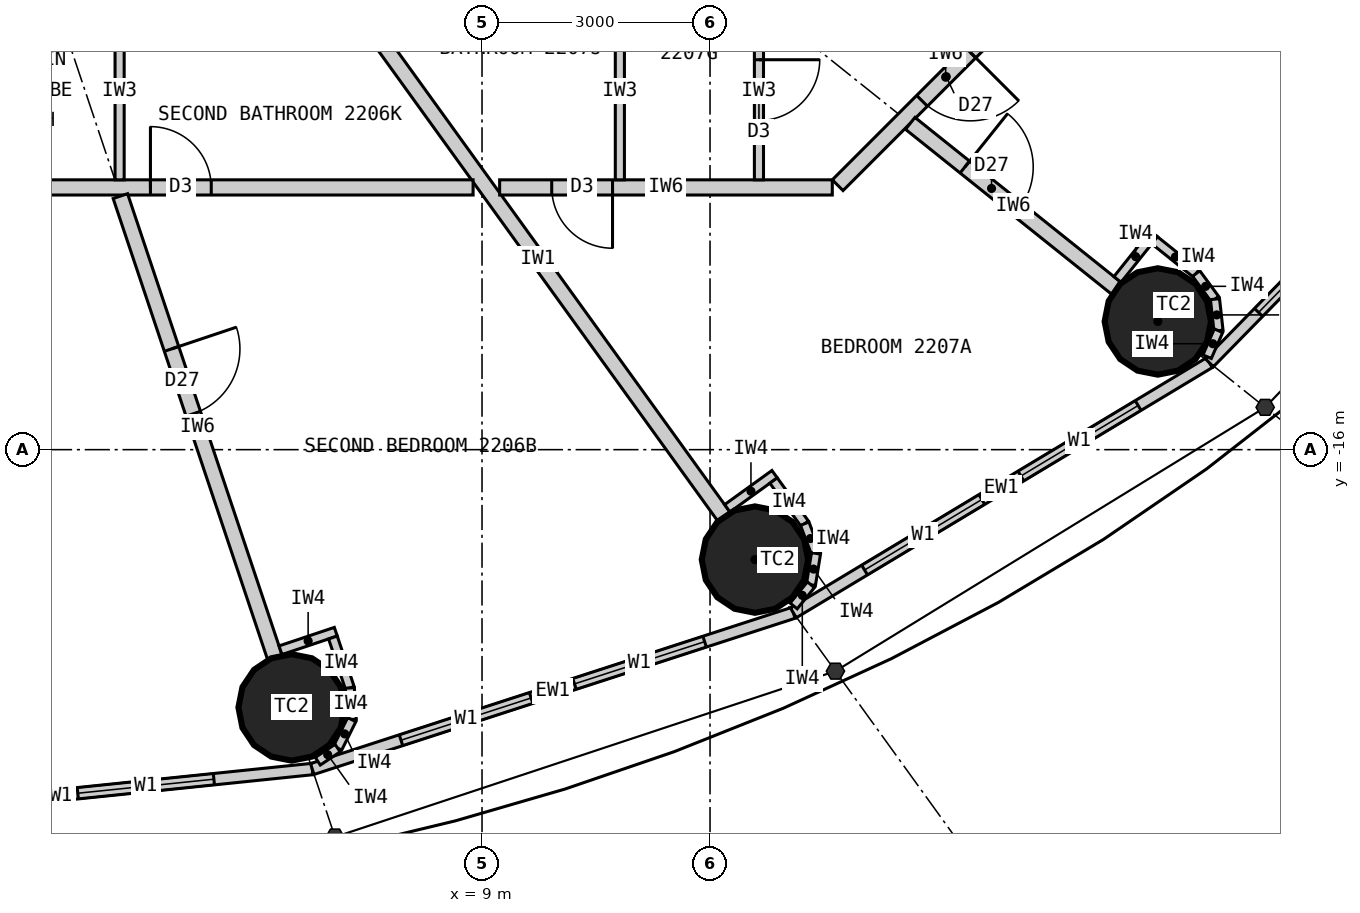
"""IFC4 building model, lengths in metres.
Left out: names, types, materials, properties, quantities, classifications, styles, units other than length and angle.
Written with IfcOpenShell. Run it as: python <this file> out.ifc"""

import sys

from ifc_helpers import new_model, si_unit, direction, frame, frame_2d, origin, origin_2d, place, context, subcontext, project, spatial, rectangle, circle, extrude, element, fill, save


model = new_model("IFC4")
c1 = context("Model", 3, precision=1e-05, world=origin(), true_north=direction((0.0, 1.0)))
c2 = subcontext(c1, "Body", "Model", "MODEL_VIEW")
j1 = project(units=[si_unit("LENGTHUNIT", "METRE"), si_unit("PLANEANGLEUNIT", "RADIAN")], contexts=[c1])
p1 = place(None, origin())
s1 = spatial("IfcSite", under=j1, at=p1, CompositionType="ELEMENT")
p2 = place(p1, origin())
s2 = spatial("IfcBuilding", under=s1, at=p2, CompositionType="ELEMENT")
p3 = place(p2, frame((0.0, 0.0, 87.0)))
s3 = spatial("IfcBuildingStorey", under=s2, at=p3, CompositionType="ELEMENT", Elevation=87.0)
for number, where, z_axis, x_axis in (
    (1, (6.495, -19.391, 0.0), (0.0, 0.0, 1.0), (1.0, 0.0, 0.0)),
    (2, (12.591, -17.447, 0.0), (0.0, 0.0, 1.0), (1.0, 0.0, 0.0)),
    (3, (17.892, -14.313, 0.0), (0.0, 0.0, 1.0), (1.0, 0.0, 0.0)),
):
    element("IfcColumn", number, at=place(p3, frame(where, z_axis=z_axis, x_axis=x_axis)), inside=s3, PredefinedType="COLUMN", context=c2, shape_type="SweptSolid", body=[
        extrude(circle(Radius=0.7, at=origin_2d()), origin(), (0.0, 0.0, 1.0), 3.3),
    ])
p4 = place(p3, frame((0.0, -20.9, 0.0), z_axis=(0.0, 0.0, 1.0), x_axis=(0.994721394369, 0.102612609291, 0.0)))
e4 = element("IfcWall", 4, at=p4, inside=s3, PredefinedType="ELEMENTEDWALL", context=c2, shape_type="SweptSolid", body=[
    extrude(rectangle(XDim=6.802, YDim=0.15, at=frame_2d((3.401, 0.0))), origin(), (0.0, 0.0, 1.0), 3.12),
])
p5 = place(p4, frame((1.301, 0.0, 0.9)))
e5 = element("IfcOpeningElement", 5, at=p5, cuts=e4, PredefinedType="OPENING", context=c2, shape_type="SweptSolid", body=[
    extrude(rectangle(XDim=1.8, YDim=1.9, at=frame_2d((0.9, 0.95))), frame((0.0, 0.085, 0.0), z_axis=(0.0, -1.0, 0.0), x_axis=(1.0, 0.0, 0.0)), (0.0, 0.0, 1.0), 0.17),
])
p6 = place(p4, frame((3.701, 0.0, 0.9)))
e6 = element("IfcOpeningElement", 6, at=p6, cuts=e4, PredefinedType="OPENING", context=c2, shape_type="SweptSolid", body=[
    extrude(rectangle(XDim=1.8, YDim=1.9, at=frame_2d((0.9, 0.95))), frame((0.0, 0.085, 0.0), z_axis=(0.0, -1.0, 0.0), x_axis=(1.0, 0.0, 0.0)), (0.0, 0.0, 1.0), 0.17),
])
p7 = place(p3, frame((6.766, -20.202, 0.0), z_axis=(0.0, 0.0, 1.0), x_axis=(0.951137534625, 0.308767534285, 0.0)))
e7 = element("IfcWall", 7, at=p7, inside=s3, PredefinedType="ELEMENTEDWALL", context=c2, shape_type="SweptSolid", body=[
    extrude(rectangle(XDim=6.655, YDim=0.15, at=frame_2d((3.328, 0.0))), origin(), (0.0, 0.0, 1.0), 3.12),
])
p8 = place(p7, frame((1.228, 0.0, 0.9)))
e8 = element("IfcOpeningElement", 8, at=p8, cuts=e7, PredefinedType="OPENING", context=c2, shape_type="SweptSolid", body=[
    extrude(rectangle(XDim=1.8, YDim=1.9, at=frame_2d((0.9, 0.95))), frame((0.0, 0.085, 0.0), z_axis=(0.0, -1.0, 0.0), x_axis=(1.0, 0.0, 0.0)), (0.0, 0.0, 1.0), 0.17),
])
p9 = place(p7, frame((3.628, 0.0, 0.9)))
e9 = element("IfcOpeningElement", 9, at=p9, cuts=e7, PredefinedType="OPENING", context=c2, shape_type="SweptSolid", body=[
    extrude(rectangle(XDim=1.8, YDim=1.9, at=frame_2d((0.9, 0.95))), frame((0.0, 0.085, 0.0), z_axis=(0.0, -1.0, 0.0), x_axis=(1.0, 0.0, 0.0)), (0.0, 0.0, 1.0), 0.17),
])
p10 = place(p3, frame((13.096, -18.147, 0.0), z_axis=(0.0, 0.0, 1.0), x_axis=(0.856983180864, 0.515344377787, 0.0)))
e10 = element("IfcWall", 10, at=p10, inside=s3, PredefinedType="ELEMENTEDWALL", context=c2, shape_type="SweptSolid", body=[
    extrude(rectangle(XDim=6.386, YDim=0.15, at=frame_2d((3.193, 0.0))), origin(), (0.0, 0.0, 1.0), 3.12),
])
p11 = place(p10, frame((1.093, 0.0, 0.9)))
e11 = element("IfcOpeningElement", 11, at=p11, cuts=e10, PredefinedType="OPENING", context=c2, shape_type="SweptSolid", body=[
    extrude(rectangle(XDim=1.8, YDim=1.9, at=frame_2d((0.9, 0.95))), frame((0.0, 0.085, 0.0), z_axis=(0.0, -1.0, 0.0), x_axis=(1.0, 0.0, 0.0)), (0.0, 0.0, 1.0), 0.17),
])
p12 = place(p10, frame((3.493, 0.0, 0.9)))
e12 = element("IfcOpeningElement", 12, at=p12, cuts=e10, PredefinedType="OPENING", context=c2, shape_type="SweptSolid", body=[
    extrude(rectangle(XDim=1.8, YDim=1.9, at=frame_2d((0.9, 0.95))), frame((0.0, 0.085, 0.0), z_axis=(0.0, -1.0, 0.0), x_axis=(1.0, 0.0, 0.0)), (0.0, 0.0, 1.0), 0.17),
])
p13 = place(p3, frame((18.57, -14.856, 0.0), z_axis=(0.0, 0.0, 1.0), x_axis=(0.699602905915, 0.714531856557, 0.0)))
e13 = element("IfcWall", 13, at=p13, inside=s3, PredefinedType="ELEMENTEDWALL", context=c2, shape_type="SweptSolid", body=[
    extrude(rectangle(XDim=6.051, YDim=0.15, at=frame_2d((3.025, 0.0))), origin(), (0.0, 0.0, 1.0), 3.12),
])
p14 = place(p13, frame((0.926, 0.0, 0.9)))
e14 = element("IfcOpeningElement", 14, at=p14, cuts=e13, PredefinedType="OPENING", context=c2, shape_type="SweptSolid", body=[
    extrude(rectangle(XDim=1.8, YDim=1.9, at=frame_2d((0.9, 0.95))), frame((0.0, 0.085, 0.0), z_axis=(0.0, -1.0, 0.0), x_axis=(1.0, 0.0, 0.0)), (0.0, 0.0, 1.0), 0.17),
])
p15 = place(p13, frame((3.325, 0.0, 0.9)))
e15 = element("IfcOpeningElement", 15, at=p15, cuts=e13, PredefinedType="OPENING", context=c2, shape_type="SweptSolid", body=[
    extrude(rectangle(XDim=1.8, YDim=1.9, at=frame_2d((0.9, 0.95))), frame((0.0, 0.085, 0.0), z_axis=(0.0, -1.0, 0.0), x_axis=(1.0, 0.0, 0.0)), (0.0, 0.0, 1.0), 0.17),
])
p16 = place(p3, frame((7.289, -10.1, 0.0), z_axis=(0.0, 0.0, 1.0), x_axis=(0.585198353053, -0.810890182197, 0.0)))
e16 = element("IfcWall", 16, at=p16, inside=s3, PredefinedType="PARTITIONING", context=c2, shape_type="SweptSolid", body=[
    extrude(rectangle(XDim=8.36, YDim=0.2, at=frame_2d((4.18, 0.0))), origin(), (0.0, 0.0, 1.0), 2.27),
])
p17 = place(p3, frame((-8.883, -12.55, 0.0), z_axis=(0.0, 0.0, 1.0), x_axis=(1.0, 0.0, 0.0)))
e17 = element("IfcWall", 17, at=p17, inside=s3, PredefinedType="PARTITIONING", context=c2, shape_type="SweptSolid", body=[
    extrude(rectangle(XDim=17.765, YDim=0.2, at=frame_2d((8.883, 0.0))), origin(), (0.0, 0.0, 1.0), 3.12),
])
p18 = place(p17, frame((3.42, 0.0, 0.0)))
e18 = element("IfcOpeningElement", 18, at=p18, cuts=e17, PredefinedType="OPENING", context=c2, shape_type="SweptSolid", body=[
    extrude(rectangle(XDim=0.8, YDim=2.1, at=frame_2d((0.4, 1.05))), frame((0.0, 0.11, 0.0), z_axis=(0.0, -1.0, 0.0), x_axis=(1.0, 0.0, 0.0)), (0.0, 0.0, 1.0), 0.22),
])
p19 = place(p17, frame((13.52, 0.0, 0.0)))
e19 = element("IfcOpeningElement", 19, at=p19, cuts=e17, PredefinedType="OPENING", context=c2, shape_type="SweptSolid", body=[
    extrude(rectangle(XDim=0.8, YDim=2.1, at=frame_2d((0.4, 1.05))), frame((0.0, 0.11, 0.0), z_axis=(0.0, -1.0, 0.0), x_axis=(1.0, 0.0, 0.0)), (0.0, 0.0, 1.0), 0.22),
])
p20 = place(p17, frame((8.42, 0.0, 0.0)))
e20 = element("IfcOpeningElement", 20, at=p20, cuts=e17, PredefinedType="OPENING", context=c2, shape_type="SweptSolid", body=[
    extrude(rectangle(XDim=0.9, YDim=2.1, at=frame_2d((0.45, 1.05))), frame((0.0, 0.11, 0.0), z_axis=(0.0, -1.0, 0.0), x_axis=(1.0, 0.0, 0.0)), (0.0, 0.0, 1.0), 0.22),
])
p21 = place(p3, frame((4.242, -12.664, 0.0), z_axis=(0.0, 0.0, 1.0), x_axis=(0.317590505374, -0.94822796357, 0.0)))
e21 = element("IfcWall", 21, at=p21, inside=s3, PredefinedType="PARTITIONING", context=c2, shape_type="SweptSolid", body=[
    extrude(rectangle(XDim=6.394, YDim=0.2, at=frame_2d((3.197, 0.0))), origin(), (0.0, 0.0, 1.0), 2.27),
])
p22 = place(p21, frame((2.12, 0.0, 0.0)))
e22 = element("IfcOpeningElement", 22, at=p22, cuts=e21, PredefinedType="OPENING", context=c2, shape_type="SweptSolid", body=[
    extrude(rectangle(XDim=0.9, YDim=2.1, at=frame_2d((0.45, 1.05))), frame((0.0, 0.11, 0.0), z_axis=(0.0, -1.0, 0.0), x_axis=(1.0, 0.0, 0.0)), (0.0, 0.0, 1.0), 0.22),
])
p23 = place(p3, frame((4.232, -10.1, 0.0), z_axis=(0.0, 0.0, 1.0), x_axis=(0.0, -1.0, 0.0)))
e23 = element("IfcWall", 23, at=p23, inside=s3, PredefinedType="PARTITIONING", context=c2, shape_type="SweptSolid", body=[
    extrude(rectangle(XDim=2.35, YDim=0.12, at=frame_2d((1.175, 0.0))), origin(), (0.0, 0.0, 1.0), 3.12),
])
p24 = place(p3, frame((9.232, -12.55, 0.0), z_axis=(0.0, 0.0, 1.0), x_axis=(1.0, 0.0, 0.0)))
e24 = element("IfcWall", 24, at=p24, inside=s3, PredefinedType="PARTITIONING", context=c2, shape_type="SweptSolid", body=[
    extrude(rectangle(XDim=4.377, YDim=0.2, at=frame_2d((2.188, 0.0))), origin(), (0.0, 0.0, 1.0), 3.12),
])
p25 = place(p24, frame((0.685, 0.0, 0.0)))
e25 = element("IfcOpeningElement", 25, at=p25, cuts=e24, PredefinedType="OPENING", context=c2, shape_type="SweptSolid", body=[
    extrude(rectangle(XDim=0.8, YDim=2.1, at=frame_2d((0.4, 1.05))), frame((0.0, 0.11, 0.0), z_axis=(0.0, -1.0, 0.0), x_axis=(1.0, 0.0, 0.0)), (0.0, 0.0, 1.0), 0.22),
])
p26 = place(p3, frame((13.679, -12.521, 0.0), z_axis=(0.0, 0.0, 1.0), x_axis=(0.707106781187, 0.707106781187, 0.0)))
e26 = element("IfcWall", 26, at=p26, inside=s3, PredefinedType="PARTITIONING", context=c2, shape_type="SweptSolid", body=[
    extrude(rectangle(XDim=4.019, YDim=0.2, at=frame_2d((2.009, 0.0))), origin(), (0.0, 0.0, 1.0), 3.12),
])
p27 = place(p26, frame((1.57, 0.0, 0.0)))
e27 = element("IfcOpeningElement", 27, at=p27, cuts=e26, PredefinedType="OPENING", context=c2, shape_type="SweptSolid", body=[
    extrude(rectangle(XDim=0.9, YDim=2.1, at=frame_2d((0.45, 1.05))), frame((0.0, 0.11, 0.0), z_axis=(0.0, -1.0, 0.0), x_axis=(1.0, 0.0, 0.0)), (0.0, 0.0, 1.0), 0.22),
])
p28 = place(p3, frame((14.634, -11.707, 0.0), z_axis=(0.0, 0.0, 1.0), x_axis=(0.780903110683, -0.624652168591, 0.0)))
e28 = element("IfcWall", 28, at=p28, inside=s3, PredefinedType="PARTITIONING", context=c2, shape_type="SweptSolid", body=[
    extrude(rectangle(XDim=3.472, YDim=0.2, at=frame_2d((1.736, 0.0))), origin(), (0.0, 0.0, 1.0), 2.27),
])
p29 = place(p28, frame((0.92, 0.0, 0.0)))
e29 = element("IfcOpeningElement", 29, at=p29, cuts=e28, PredefinedType="OPENING", context=c2, shape_type="SweptSolid", body=[
    extrude(rectangle(XDim=0.9, YDim=2.1, at=frame_2d((0.45, 1.05))), frame((0.0, 0.11, 0.0), z_axis=(0.0, -1.0, 0.0), x_axis=(1.0, 0.0, 0.0)), (0.0, 0.0, 1.0), 0.22),
])
p30 = place(p3, frame((10.814, -10.1, 0.0), z_axis=(0.0, 0.0, 1.0), x_axis=(0.0, -1.0, 0.0)))
e30 = element("IfcWall", 30, at=p30, inside=s3, PredefinedType="PARTITIONING", context=c2, shape_type="SweptSolid", body=[
    extrude(rectangle(XDim=2.35, YDim=0.12, at=frame_2d((1.175, 0.0))), origin(), (0.0, 0.0, 1.0), 3.12),
])
p31 = place(p3, frame((12.644, -10.1, 0.0), z_axis=(0.0, 0.0, 1.0), x_axis=(0.0, -1.0, 0.0)))
e31 = element("IfcWall", 31, at=p31, inside=s3, PredefinedType="PARTITIONING", context=c2, shape_type="SweptSolid", body=[
    extrude(rectangle(XDim=2.35, YDim=0.12, at=frame_2d((1.175, 0.0))), origin(), (0.0, 0.0, 1.0), 3.12),
])
p32 = place(p31, frame((0.77, 0.0, 0.0)))
e32 = element("IfcOpeningElement", 32, at=p32, cuts=e31, PredefinedType="OPENING", context=c2, shape_type="SweptSolid", body=[
    extrude(rectangle(XDim=0.8, YDim=2.1, at=frame_2d((0.4, 1.05))), frame((0.0, 0.07, 0.0), z_axis=(0.0, -1.0, 0.0), x_axis=(1.0, 0.0, 0.0)), (0.0, 0.0, 1.0), 0.14),
])
p33 = place(p3, frame((6.348, -18.639, 0.0), z_axis=(0.0, 0.0, 1.0), x_axis=(0.948268951266, 0.317468102437, 0.0)))
e33 = element("IfcWall", 33, at=p33, inside=s3, PredefinedType="PARTITIONING", context=c2, shape_type="SweptSolid", body=[
    extrude(rectangle(XDim=0.768, YDim=0.12, at=frame_2d((0.384, 0.0))), origin(), (0.0, 0.0, 1.0), 3.12),
])
p34 = place(p3, frame((7.038, -18.471, 0.0), z_axis=(0.0, 0.0, 1.0), x_axis=(0.317378466199, -0.9482989556, 0.0)))
e34 = element("IfcWall", 34, at=p34, inside=s3, PredefinedType="PARTITIONING", context=c2, shape_type="SweptSolid", body=[
    extrude(rectangle(XDim=0.7, YDim=0.12, at=frame_2d((0.35, 0.0))), origin(), (0.0, 0.0, 1.0), 3.12),
])
p35 = place(p3, frame((7.26, -19.135, 0.0), z_axis=(0.0, 0.0, 1.0), x_axis=(0.0613238046, -0.99811792439, 0.0)))
e35 = element("IfcWall", 35, at=p35, inside=s3, PredefinedType="PARTITIONING", context=c2, shape_type="SweptSolid", body=[
    extrude(rectangle(XDim=0.418, YDim=0.12, at=frame_2d((0.209, 0.0))), origin(), (0.0, 0.0, 1.0), 3.12),
])
p36 = place(p3, frame((7.286, -19.552, 0.0), z_axis=(0.0, 0.0, 1.0), x_axis=(-0.445810757773, -0.89512723579, 0.0)))
e36 = element("IfcWall", 36, at=p36, inside=s3, PredefinedType="PARTITIONING", context=c2, shape_type="SweptSolid", body=[
    extrude(rectangle(XDim=0.418, YDim=0.12, at=frame_2d((0.209, 0.0))), origin(), (0.0, 0.0, 1.0), 3.12),
])
p37 = place(p3, frame((7.1, -19.926, 0.0), z_axis=(0.0, 0.0, 1.0), x_axis=(-0.833488262509, -0.552537162787, 0.0)))
e37 = element("IfcWall", 37, at=p37, inside=s3, PredefinedType="PARTITIONING", context=c2, shape_type="SweptSolid", body=[
    extrude(rectangle(XDim=0.313, YDim=0.12, at=frame_2d((0.156, 0.0))), origin(), (0.0, 0.0, 1.0), 3.12),
])
p38 = place(p3, frame((12.227, -16.772, 0.0), z_axis=(0.0, 0.0, 1.0), x_axis=(0.810821798253, 0.585293098778, 0.0)))
e38 = element("IfcWall", 38, at=p38, inside=s3, PredefinedType="PARTITIONING", context=c2, shape_type="SweptSolid", body=[
    extrude(rectangle(XDim=0.768, YDim=0.12, at=frame_2d((0.384, 0.0))), origin(), (0.0, 0.0, 1.0), 3.12),
])
p39 = place(p3, frame((12.836, -16.406, 0.0), z_axis=(0.0, 0.0, 1.0), x_axis=(0.585223113993, -0.810872312296, 0.0)))
e39 = element("IfcWall", 39, at=p39, inside=s3, PredefinedType="PARTITIONING", context=c2, shape_type="SweptSolid", body=[
    extrude(rectangle(XDim=0.7, YDim=0.12, at=frame_2d((0.35, 0.0))), origin(), (0.0, 0.0, 1.0), 3.12),
])
p40 = place(p3, frame((13.246, -16.974, 0.0), z_axis=(0.0, 0.0, 1.0), x_axis=(0.355728122235, -0.934589483705, 0.0)))
e40 = element("IfcWall", 40, at=p40, inside=s3, PredefinedType="PARTITIONING", context=c2, shape_type="SweptSolid", body=[
    extrude(rectangle(XDim=0.418, YDim=0.12, at=frame_2d((0.209, 0.0))), origin(), (0.0, 0.0, 1.0), 3.12),
])
p41 = place(p3, frame((13.394, -17.365, 0.0), z_axis=(0.0, 0.0, 1.0), x_axis=(-0.159379276926, -0.987217425943, 0.0)))
e41 = element("IfcWall", 41, at=p41, inside=s3, PredefinedType="PARTITIONING", context=c2, shape_type="SweptSolid", body=[
    extrude(rectangle(XDim=0.418, YDim=0.12, at=frame_2d((0.209, 0.0))), origin(), (0.0, 0.0, 1.0), 3.12),
])
p42 = place(p3, frame((13.328, -17.777, 0.0), z_axis=(0.0, 0.0, 1.0), x_axis=(-0.632276783541, -0.774742582407, 0.0)))
e42 = element("IfcWall", 42, at=p42, inside=s3, PredefinedType="PARTITIONING", context=c2, shape_type="SweptSolid", body=[
    extrude(rectangle(XDim=0.36, YDim=0.12, at=frame_2d((0.18, 0.0))), origin(), (0.0, 0.0, 1.0), 3.12),
])
p43 = place(p3, frame((17.361, -13.76, 0.0), z_axis=(0.0, 0.0, 1.0), x_axis=(0.624501042889, 0.781023973659, 0.0)))
e43 = element("IfcWall", 43, at=p43, inside=s3, PredefinedType="PARTITIONING", context=c2, shape_type="SweptSolid", body=[
    extrude(rectangle(XDim=0.767, YDim=0.12, at=frame_2d((0.384, 0.0))), origin(), (0.0, 0.0, 1.0), 3.12),
])
p44 = place(p3, frame((17.85, -13.246, 0.0), z_axis=(0.0, 0.0, 1.0), x_axis=(0.780902834923, -0.62465251333, 0.0)))
e44 = element("IfcWall", 44, at=p44, inside=s3, PredefinedType="PARTITIONING", context=c2, shape_type="SweptSolid", body=[
    extrude(rectangle(XDim=0.7, YDim=0.12, at=frame_2d((0.35, 0.0))), origin(), (0.0, 0.0, 1.0), 3.12),
])
for number, where, z_axis, x_axis in (
    (45, (18.396, -13.683, 0.0), (0.0, 0.0, 1.0), (0.592, -0.806, 0.0)),
    (46, (18.644, -14.02, 0.0), (0.0, 0.0, 1.0), (0.11, -0.994, 0.0)),
):
    element("IfcWall", number, at=place(p3, frame(where, z_axis=z_axis, x_axis=x_axis)), inside=s3, PredefinedType="PARTITIONING", context=c2, shape_type="SweptSolid", body=[
        extrude(rectangle(XDim=0.418, YDim=0.12, at=frame_2d((0.209, 0.0))), origin(), (0.0, 0.0, 1.0), 3.12),
    ])
p45 = place(p3, frame((18.69, -14.435, 0.0), z_axis=(0.0, 0.0, 1.0), x_axis=(-0.401093412634, -0.91603715773, 0.0)))
e47 = element("IfcWall", 47, at=p45, inside=s3, PredefinedType="PARTITIONING", context=c2, shape_type="SweptSolid", body=[
    extrude(rectangle(XDim=0.373, YDim=0.12, at=frame_2d((0.187, 0.0))), origin(), (0.0, 0.0, 1.0), 3.12),
])
p46 = place(p6, origin())
e48 = element("IfcWindow", 48, at=p46, inside=s3, PartitioningType="SINGLE_PANEL", PredefinedType="WINDOW", context=c2, shape_type="SweptSolid", body=[
    extrude(rectangle(XDim=1.8, YDim=1.9, at=frame_2d((0.9, 0.95))), frame((0.0, 0.03, 0.0), z_axis=(0.0, -1.0, 0.0), x_axis=(1.0, 0.0, 0.0)), (0.0, 0.0, 1.0), 0.06),
])
fill(e6, e48)
p47 = place(p8, origin())
e49 = element("IfcWindow", 49, at=p47, inside=s3, PartitioningType="SINGLE_PANEL", PredefinedType="WINDOW", context=c2, shape_type="SweptSolid", body=[
    extrude(rectangle(XDim=1.8, YDim=1.9, at=frame_2d((0.9, 0.95))), frame((0.0, 0.03, 0.0), z_axis=(0.0, -1.0, 0.0), x_axis=(1.0, 0.0, 0.0)), (0.0, 0.0, 1.0), 0.06),
])
fill(e8, e49)
p48 = place(p9, origin())
e50 = element("IfcWindow", 50, at=p48, inside=s3, PartitioningType="SINGLE_PANEL", PredefinedType="WINDOW", context=c2, shape_type="SweptSolid", body=[
    extrude(rectangle(XDim=1.8, YDim=1.9, at=frame_2d((0.9, 0.95))), frame((0.0, 0.03, 0.0), z_axis=(0.0, -1.0, 0.0), x_axis=(1.0, 0.0, 0.0)), (0.0, 0.0, 1.0), 0.06),
])
fill(e9, e50)
p49 = place(p11, origin())
e51 = element("IfcWindow", 51, at=p49, inside=s3, PartitioningType="SINGLE_PANEL", PredefinedType="WINDOW", context=c2, shape_type="SweptSolid", body=[
    extrude(rectangle(XDim=1.8, YDim=1.9, at=frame_2d((0.9, 0.95))), frame((0.0, 0.03, 0.0), z_axis=(0.0, -1.0, 0.0), x_axis=(1.0, 0.0, 0.0)), (0.0, 0.0, 1.0), 0.06),
])
fill(e11, e51)
p50 = place(p12, origin())
e52 = element("IfcWindow", 52, at=p50, inside=s3, PartitioningType="SINGLE_PANEL", PredefinedType="WINDOW", context=c2, shape_type="SweptSolid", body=[
    extrude(rectangle(XDim=1.8, YDim=1.9, at=frame_2d((0.9, 0.95))), frame((0.0, 0.03, 0.0), z_axis=(0.0, -1.0, 0.0), x_axis=(1.0, 0.0, 0.0)), (0.0, 0.0, 1.0), 0.06),
])
fill(e12, e52)
p51 = place(p14, origin())
e53 = element("IfcWindow", 53, at=p51, inside=s3, PartitioningType="SINGLE_PANEL", PredefinedType="WINDOW", context=c2, shape_type="SweptSolid", body=[
    extrude(rectangle(XDim=1.8, YDim=1.9, at=frame_2d((0.9, 0.95))), frame((0.0, 0.03, 0.0), z_axis=(0.0, -1.0, 0.0), x_axis=(1.0, 0.0, 0.0)), (0.0, 0.0, 1.0), 0.06),
])
fill(e14, e53)
p52 = place(p19, origin())
e54 = element("IfcDoor", 54, at=p52, inside=s3, OperationType="SINGLE_SWING_LEFT", PredefinedType="DOOR", context=c2, shape_type="SweptSolid", body=[
    extrude(rectangle(XDim=0.8, YDim=2.1, at=frame_2d((0.4, 1.05))), frame((0.0, 0.025, 0.0), z_axis=(0.0, -1.0, 0.0), x_axis=(1.0, 0.0, 0.0)), (0.0, 0.0, 1.0), 0.05),
])
fill(e19, e54)
p53 = place(p22, origin())
e55 = element("IfcDoor", 55, at=p53, inside=s3, OperationType="SINGLE_SWING_LEFT", PredefinedType="DOOR", context=c2, shape_type="SweptSolid", body=[
    extrude(rectangle(XDim=0.9, YDim=2.1, at=frame_2d((0.45, 1.05))), frame((0.0, 0.025, 0.0), z_axis=(0.0, -1.0, 0.0), x_axis=(1.0, 0.0, 0.0)), (0.0, 0.0, 1.0), 0.05),
])
fill(e22, e55)
p54 = place(p25, origin())
e56 = element("IfcDoor", 56, at=p54, inside=s3, OperationType="SINGLE_SWING_RIGHT", PredefinedType="DOOR", context=c2, shape_type="SweptSolid", body=[
    extrude(rectangle(XDim=0.8, YDim=2.1, at=frame_2d((0.4, 1.05))), frame((0.0, 0.025, 0.0), z_axis=(0.0, -1.0, 0.0), x_axis=(1.0, 0.0, 0.0)), (0.0, 0.0, 1.0), 0.05),
])
fill(e25, e56)
p55 = place(p32, origin())
e57 = element("IfcDoor", 57, at=p55, inside=s3, OperationType="SINGLE_SWING_LEFT", PredefinedType="DOOR", context=c2, shape_type="SweptSolid", body=[
    extrude(rectangle(XDim=0.8, YDim=2.1, at=frame_2d((0.4, 1.05))), frame((0.0, 0.025, 0.0), z_axis=(0.0, -1.0, 0.0), x_axis=(1.0, 0.0, 0.0)), (0.0, 0.0, 1.0), 0.05),
])
fill(e32, e57)
p56 = place(p27, origin())
e58 = element("IfcDoor", 58, at=p56, inside=s3, OperationType="SINGLE_SWING_RIGHT", PredefinedType="DOOR", context=c2, shape_type="SweptSolid", body=[
    extrude(rectangle(XDim=0.9, YDim=2.1, at=frame_2d((0.45, 1.05))), frame((0.0, 0.025, 0.0), z_axis=(0.0, -1.0, 0.0), x_axis=(1.0, 0.0, 0.0)), (0.0, 0.0, 1.0), 0.05),
])
fill(e27, e58)
p57 = place(p29, origin())
e59 = element("IfcDoor", 59, at=p57, inside=s3, OperationType="SINGLE_SWING_LEFT", PredefinedType="DOOR", context=c2, shape_type="SweptSolid", body=[
    extrude(rectangle(XDim=0.9, YDim=2.1, at=frame_2d((0.45, 1.05))), frame((0.0, 0.025, 0.0), z_axis=(0.0, -1.0, 0.0), x_axis=(1.0, 0.0, 0.0)), (0.0, 0.0, 1.0), 0.05),
])
fill(e29, e59)
save(model, sys.argv[1])
